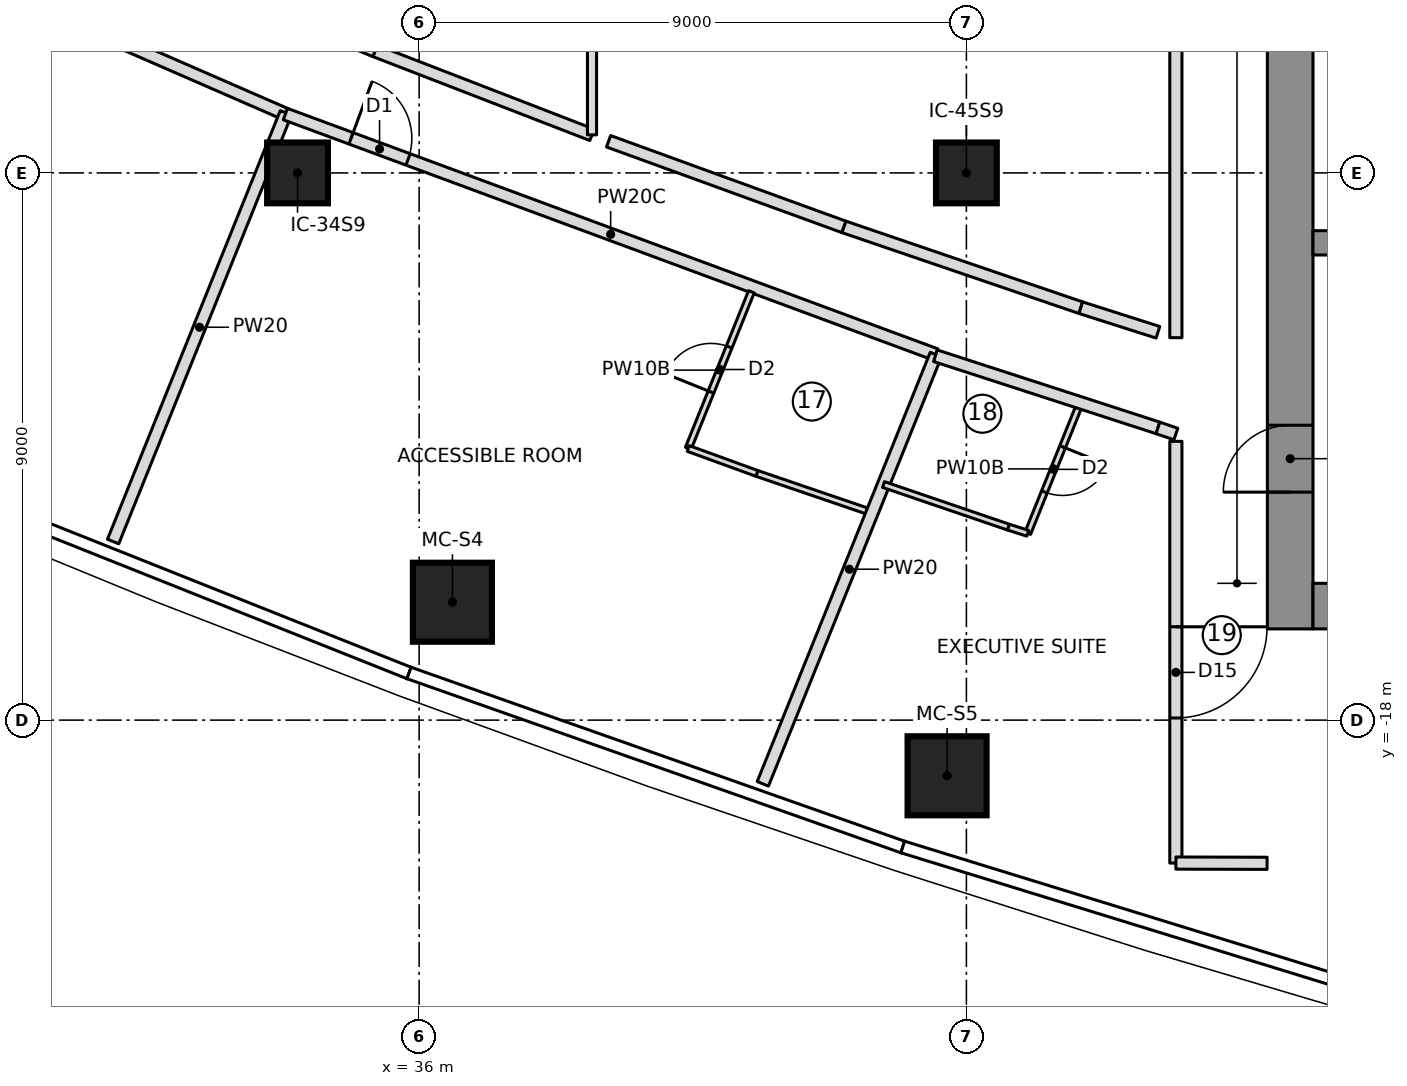
"""IFC4 building model, lengths in metres.
Left out: names, types, materials, properties, quantities, classifications, styles, units other than length and angle.
Written with IfcOpenShell. Run it as: python <this file> out.ifc"""

import sys

from ifc_helpers import new_model, si_unit, direction, frame, frame_2d, origin, origin_2d, place, context, subcontext, project, spatial, rectangle, extrude, element, fill, save


model = new_model("IFC4")
c1 = context("Model", 3, precision=1e-05, world=origin(), true_north=direction((0.0, 1.0)))
c2 = subcontext(c1, "Body", "Model", "MODEL_VIEW")
j1 = project(units=[si_unit("LENGTHUNIT", "METRE"), si_unit("PLANEANGLEUNIT", "RADIAN")], contexts=[c1])
p1 = place(None, origin())
s1 = spatial("IfcSite", under=j1, at=p1, CompositionType="ELEMENT")
p2 = place(p1, origin())
s2 = spatial("IfcBuilding", under=s1, at=p2, CompositionType="ELEMENT")
p3 = place(p2, frame((0.0, 0.0, 186.15)))
s3 = spatial("IfcBuildingStorey", under=s2, at=p3, CompositionType="ELEMENT", Elevation=186.15)
p4 = place(p3, frame((50.325, -16.5, 0.0), z_axis=(0.0, 0.0, 1.0), x_axis=(0.0, 1.0, 0.0)))
e1 = element("IfcWall", 1, at=p4, inside=s3, PredefinedType="SHEAR", context=c2, shape_type="SweptSolid", body=[
    extrude(rectangle(XDim=9.85, YDim=0.75, at=frame_2d((4.925, 0.0))), origin(), (0.0, 0.0, 1.0), 3.55),
])
p5 = place(p4, frame((2.25, 0.0, 0.0)))
e2 = element("IfcOpeningElement", 2, at=p5, cuts=e1, PredefinedType="OPENING", context=c2, shape_type="SweptSolid", body=[
    extrude(rectangle(XDim=1.1, YDim=2.1, at=frame_2d((0.55, 1.05))), frame((0.0, 0.385, 0.0), z_axis=(0.0, -1.0, 0.0), x_axis=(1.0, 0.0, 0.0)), (0.0, 0.0, 1.0), 0.77),
])
p6 = place(p3, frame((50.7, -16.125, 0.0), z_axis=(0.0, 0.0, 1.0), x_axis=(1.0, 0.0, 0.0)))
e3 = element("IfcWall", 3, at=p6, inside=s3, PredefinedType="SHEAR", context=c2, shape_type="SweptSolid", body=[
    extrude(rectangle(XDim=13.77, YDim=0.75, at=frame_2d((6.885, 0.0))), origin(), (0.0, 0.0, 1.0), 3.55),
])
p7 = place(p3, frame((50.7, -10.15, 0.0), z_axis=(0.0, 0.0, 1.0), x_axis=(1.0, 0.0, 0.0)))
e4 = element("IfcWall", 4, at=p7, inside=s3, PredefinedType="SHEAR", context=c2, shape_type="SweptSolid", body=[
    extrude(rectangle(XDim=13.02, YDim=0.4, at=frame_2d((6.51, 0.0))), origin(), (0.0, 0.0, 1.0), 3.55),
])
for number, where, z_axis, x_axis in (
    (5, (36.547, -16.061, 0.0), (0.0, 0.0, 1.0), (1.0, 0.0, 0.0)),
    (6, (44.683, -18.916, 0.0), (0.0, 0.0, 1.0), (1.0, 0.0, 0.0)),
):
    element("IfcColumn", number, at=place(p3, frame(where, z_axis=z_axis, x_axis=x_axis)), inside=s3, PredefinedType="COLUMN", context=c2, shape_type="SweptSolid", body=[
        extrude(rectangle(XDim=1.3, YDim=1.3, at=origin_2d()), origin(), (0.0, 0.0, 1.0), 3.55),
    ])
for number, where, z_axis, x_axis in (
    (7, (34.0, -9.0, 0.0), (0.0, 0.0, 1.0), (1.0, 0.0, 0.0)),
    (8, (45.0, -9.0, 0.0), (0.0, 0.0, 1.0), (1.0, 0.0, 0.0)),
):
    element("IfcColumn", number, at=place(p3, frame(where, z_axis=z_axis, x_axis=x_axis)), inside=s3, PredefinedType="COLUMN", context=c2, shape_type="SweptSolid", body=[
        extrude(rectangle(XDim=1.0, YDim=1.0, at=origin_2d()), origin(), (0.0, 0.0, 1.0), 3.55),
    ])
p8 = place(p3, frame((23.354, -3.479, 0.0), z_axis=(0.0, 0.0, 1.0), x_axis=(0.916726746983, -0.399514794926, 0.0)))
e9 = element("IfcWall", 9, at=p8, inside=s3, PredefinedType="PARTITIONING", context=c2, shape_type="SweptSolid", body=[
    extrude(rectangle(XDim=11.396, YDim=0.2, at=frame_2d((5.698, 0.0))), origin(), (0.0, 0.0, 1.0), 3.25),
])
p9 = place(p8, frame((3.05, 0.0, 0.0)))
e10 = element("IfcOpeningElement", 10, at=p9, cuts=e9, PredefinedType="OPENING", context=c2, shape_type="SweptSolid", body=[
    extrude(rectangle(XDim=1.0, YDim=2.1, at=frame_2d((0.5, 1.05))), frame((0.0, 0.11, 0.0), z_axis=(0.0, -1.0, 0.0), x_axis=(1.0, 0.0, 0.0)), (0.0, 0.0, 1.0), 0.22),
])
p10 = place(p3, frame((30.967, -15.063, 0.0), z_axis=(0.0, 0.0, 1.0), x_axis=(0.373887223455, 0.927474174378, 0.0)))
e11 = element("IfcWall", 11, at=p10, inside=s3, PredefinedType="PARTITIONING", context=c2, shape_type="SweptSolid", body=[
    extrude(rectangle(XDim=7.6, YDim=0.2, at=frame_2d((3.8, 0.0))), origin(), (0.0, 0.0, 1.0), 3.25),
])
p11 = place(p3, frame((33.801, -8.032, 0.0), z_axis=(0.0, 0.0, 1.0), x_axis=(0.937916242759, -0.346861819127, 0.0)))
e12 = element("IfcWall", 12, at=p11, inside=s3, PredefinedType="PARTITIONING", context=c2, shape_type="SweptSolid", body=[
    extrude(rectangle(XDim=11.405, YDim=0.2, at=frame_2d((5.702, 0.0))), origin(), (0.0, 0.0, 1.0), 3.25),
])
p12 = place(p11, frame((1.15, 0.0, 0.0)))
e13 = element("IfcOpeningElement", 13, at=p12, cuts=e12, PredefinedType="OPENING", context=c2, shape_type="SweptSolid", body=[
    extrude(rectangle(XDim=1.0, YDim=2.1, at=frame_2d((0.5, 1.05))), frame((0.0, 0.11, 0.0), z_axis=(0.0, -1.0, 0.0), x_axis=(1.0, 0.0, 0.0)), (0.0, 0.0, 1.0), 0.22),
])
p13 = place(p3, frame((40.426, -13.532, 0.0), z_axis=(0.0, 0.0, 1.0), x_axis=(0.373889095325, 0.927473419779, 0.0)))
e14 = element("IfcWall", 14, at=p13, inside=s3, PredefinedType="PARTITIONING", context=c2, shape_type="SweptSolid", body=[
    extrude(rectangle(XDim=2.778, YDim=0.1, at=frame_2d((1.389, 0.0))), origin(), (0.0, 0.0, 1.0), 3.25),
])
p14 = place(p13, frame((1.0, 0.0, 0.0)))
e15 = element("IfcOpeningElement", 15, at=p14, cuts=e14, PredefinedType="OPENING", context=c2, shape_type="SweptSolid", body=[
    extrude(rectangle(XDim=0.8, YDim=2.1, at=frame_2d((0.4, 1.05))), frame((0.0, 0.06, 0.0), z_axis=(0.0, -1.0, 0.0), x_axis=(1.0, 0.0, 0.0)), (0.0, 0.0, 1.0), 0.12),
])
p15 = place(p3, frame((43.449, -14.589, 0.0), z_axis=(0.0, 0.0, 1.0), x_axis=(-0.94641533286, 0.322952036265, 0.0)))
e16 = element("IfcWall", 16, at=p15, inside=s3, PredefinedType="PARTITIONING", context=c2, shape_type="SweptSolid", body=[
    extrude(rectangle(XDim=2.002, YDim=0.1, at=frame_2d((1.001, 0.0))), origin(), (0.0, 0.0, 1.0), 3.25),
])
p16 = place(p3, frame((41.555, -13.943, 0.0), z_axis=(0.0, 0.0, 1.0), x_axis=(-0.939781557461, 0.341775692897, 0.0)))
e17 = element("IfcWall", 17, at=p16, inside=s3, PredefinedType="PARTITIONING", context=c2, shape_type="SweptSolid", body=[
    extrude(rectangle(XDim=1.201, YDim=0.1, at=frame_2d((0.601, 0.0))), origin(), (0.0, 0.0, 1.0), 3.25),
])
p17 = place(p3, frame((41.652, -19.048, 0.0), z_axis=(0.0, 0.0, 1.0), x_axis=(0.373877998371, 0.927477893178, 0.0)))
e18 = element("IfcWall", 18, at=p17, inside=s3, PredefinedType="PARTITIONING", context=c2, shape_type="SweptSolid", body=[
    extrude(rectangle(XDim=7.611, YDim=0.2, at=frame_2d((3.806, 0.0))), origin(), (0.0, 0.0, 1.0), 3.25),
])
p18 = place(p3, frame((46.863, -12.809, 0.0), z_axis=(0.0, 0.0, 1.0), x_axis=(-0.373877855241, -0.927477950876, 0.0)))
e19 = element("IfcWall", 19, at=p18, inside=s3, PredefinedType="PARTITIONING", context=c2, shape_type="SweptSolid", body=[
    extrude(rectangle(XDim=2.283, YDim=0.1, at=frame_2d((1.142, 0.0))), origin(), (0.0, 0.0, 1.0), 3.25),
])
p19 = place(p18, frame((0.75, 0.0, 0.0)))
e20 = element("IfcOpeningElement", 20, at=p19, cuts=e19, PredefinedType="OPENING", context=c2, shape_type="SweptSolid", body=[
    extrude(rectangle(XDim=0.8, YDim=2.1, at=frame_2d((0.4, 1.05))), frame((0.0, 0.06, 0.0), z_axis=(0.0, -1.0, 0.0), x_axis=(1.0, 0.0, 0.0)), (0.0, 0.0, 1.0), 0.12),
])
p20 = place(p3, frame((46.009, -14.927, 0.0), z_axis=(0.0, 0.0, 1.0), x_axis=(-0.952618746207, 0.304166935045, 0.0)))
e21 = element("IfcWall", 21, at=p20, inside=s3, PredefinedType="PARTITIONING", context=c2, shape_type="SweptSolid", body=[
    extrude(rectangle(XDim=0.335, YDim=0.1, at=frame_2d((0.167, 0.0))), origin(), (0.0, 0.0, 1.0), 3.25),
])
p21 = place(p3, frame((45.69, -14.825, 0.0), z_axis=(0.0, 0.0, 1.0), x_axis=(-0.946442988685, 0.322870979136, 0.0)))
e22 = element("IfcWall", 22, at=p21, inside=s3, PredefinedType="PARTITIONING", context=c2, shape_type="SweptSolid", body=[
    extrude(rectangle(XDim=2.169, YDim=0.1, at=frame_2d((1.085, 0.0))), origin(), (0.0, 0.0, 1.0), 3.25),
])
p22 = place(p3, frame((38.843, -8.374, 0.0), z_axis=(0.0, 0.0, 1.0), x_axis=(-0.932681040007, 0.360702200731, 0.0)))
e23 = element("IfcWall", 23, at=p22, inside=s3, PredefinedType="PARTITIONING", context=c2, shape_type="SweptSolid", body=[
    extrude(rectangle(XDim=3.825, YDim=0.2, at=frame_2d((1.913, 0.0))), origin(), (0.0, 0.0, 1.0), 3.25),
])
p23 = place(p3, frame((35.276, -6.994, 0.0), z_axis=(0.0, 0.0, 1.0), x_axis=(-0.925186207522, 0.37951347988, 0.0)))
e24 = element("IfcWall", 24, at=p23, inside=s3, PredefinedType="PARTITIONING", context=c2, shape_type="SweptSolid", body=[
    extrude(rectangle(XDim=2.375, YDim=0.2, at=frame_2d((1.187, 0.0))), origin(), (0.0, 0.0, 1.0), 3.25),
])
p24 = place(p3, frame((38.843, -8.374, 0.0), z_axis=(0.0, 0.0, 1.0), x_axis=(0.0, 1.0, 0.0)))
e25 = element("IfcWall", 25, at=p24, inside=s3, PredefinedType="PARTITIONING", context=c2, shape_type="SweptSolid", body=[
    extrude(rectangle(XDim=16.748, YDim=0.15, at=frame_2d((8.374, 0.0))), origin(), (0.0, 0.0, 1.0), 3.25),
])
for number, where, z_axis, x_axis in (
    (26, (46.881, -11.217, 0.0), (0.0, 0.0, 1.0), (-0.946, 0.323, 0.0)),
    (27, (42.984, -9.887, 0.0), (0.0, 0.0, 1.0), (-0.94, 0.342, 0.0)),
):
    element("IfcWall", number, at=place(p3, frame(where, z_axis=z_axis, x_axis=x_axis)), inside=s3, PredefinedType="PARTITIONING", context=c2, shape_type="SweptSolid", body=[
        extrude(rectangle(XDim=4.117, YDim=0.2, at=frame_2d((2.059, 0.0))), origin(), (0.0, 0.0, 1.0), 3.25),
    ])
p25 = place(p3, frame((44.49, -12.007, 0.0), z_axis=(0.0, 0.0, 1.0), x_axis=(0.951228355446, -0.308487626648, 0.0)))
e28 = element("IfcWall", 28, at=p25, inside=s3, PredefinedType="PARTITIONING", context=c2, shape_type="SweptSolid", body=[
    extrude(rectangle(XDim=3.847, YDim=0.2, at=frame_2d((1.924, 0.0))), origin(), (0.0, 0.0, 1.0), 3.25),
])
p26 = place(p3, frame((48.15, -11.621, 0.0), z_axis=(0.0, 0.0, 1.0), x_axis=(-0.952761948983, 0.303718074157, 0.0)))
e29 = element("IfcWall", 29, at=p26, inside=s3, PredefinedType="PARTITIONING", context=c2, shape_type="SweptSolid", body=[
    extrude(rectangle(XDim=1.332, YDim=0.2, at=frame_2d((0.666, 0.0))), origin(), (0.0, 0.0, 1.0), 3.25),
])
p27 = place(p3, frame((48.445, 11.71, 0.0), z_axis=(0.0, 0.0, 1.0), x_axis=(0.0, -1.0, 0.0)))
e30 = element("IfcWall", 30, at=p27, inside=s3, PredefinedType="PARTITIONING", context=c2, shape_type="SweptSolid", body=[
    extrude(rectangle(XDim=23.42, YDim=0.2, at=frame_2d((11.71, 0.0))), origin(), (0.0, 0.0, 1.0), 3.25),
])
p28 = place(p3, frame((48.15, -13.194, 0.0), z_axis=(0.0, 0.0, 1.0), x_axis=(0.946069343286, -0.323964191994, 0.0)))
e31 = element("IfcWall", 31, at=p28, inside=s3, PredefinedType="PARTITIONING", context=c2, shape_type="SweptSolid", body=[
    extrude(rectangle(XDim=0.312, YDim=0.2, at=frame_2d((0.156, 0.0))), origin(), (0.0, 0.0, 1.0), 3.25),
])
p29 = place(p3, frame((48.445, -13.415, 0.0), z_axis=(0.0, 0.0, 1.0), x_axis=(0.0, -1.0, 0.0)))
e32 = element("IfcWall", 32, at=p29, inside=s3, PredefinedType="PARTITIONING", context=c2, shape_type="SweptSolid", body=[
    extrude(rectangle(XDim=6.936, YDim=0.2, at=frame_2d((3.468, 0.0))), origin(), (0.0, 0.0, 1.0), 3.25),
])
p30 = place(p29, frame((3.05, 0.0, 0.0)))
e33 = element("IfcOpeningElement", 33, at=p30, cuts=e32, PredefinedType="OPENING", context=c2, shape_type="SweptSolid", body=[
    extrude(rectangle(XDim=1.5, YDim=2.1, at=frame_2d((0.75, 1.05))), frame((0.0, 0.11, 0.0), z_axis=(0.0, -1.0, 0.0), x_axis=(1.0, 0.0, 0.0)), (0.0, 0.0, 1.0), 0.22),
])
p31 = place(p3, frame((48.445, -20.351, 0.0), z_axis=(0.0, 0.0, 1.0), x_axis=(0.999996609175, -0.002604157836, 0.0)))
e34 = element("IfcWall", 34, at=p31, inside=s3, PredefinedType="PARTITIONING", context=c2, shape_type="SweptSolid", body=[
    extrude(rectangle(XDim=1.5, YDim=0.2, at=frame_2d((0.75, 0.0))), origin(), (0.0, 0.0, 1.0), 3.25),
])
p32 = place(p14, origin())
e35 = element("IfcDoor", 35, at=p32, inside=s3, OperationType="SINGLE_SWING_LEFT", PredefinedType="DOOR", context=c2, shape_type="SweptSolid", body=[
    extrude(rectangle(XDim=0.8, YDim=2.1, at=frame_2d((0.4, 1.05))), frame((0.0, 0.025, 0.0), z_axis=(0.0, -1.0, 0.0), x_axis=(1.0, 0.0, 0.0)), (0.0, 0.0, 1.0), 0.05),
])
fill(e15, e35)
p33 = place(p12, origin())
e36 = element("IfcDoor", 36, at=p33, inside=s3, OperationType="SINGLE_SWING_LEFT", PredefinedType="DOOR", context=c2, shape_type="SweptSolid", body=[
    extrude(rectangle(XDim=1.0, YDim=2.1, at=frame_2d((0.5, 1.05))), frame((0.0, 0.025, 0.0), z_axis=(0.0, -1.0, 0.0), x_axis=(1.0, 0.0, 0.0)), (0.0, 0.0, 1.0), 0.05),
])
fill(e13, e36)
p34 = place(p19, origin())
e37 = element("IfcDoor", 37, at=p34, inside=s3, OperationType="SINGLE_SWING_LEFT", PredefinedType="DOOR", context=c2, shape_type="SweptSolid", body=[
    extrude(rectangle(XDim=0.8, YDim=2.1, at=frame_2d((0.4, 1.05))), frame((0.0, 0.025, 0.0), z_axis=(0.0, -1.0, 0.0), x_axis=(1.0, 0.0, 0.0)), (0.0, 0.0, 1.0), 0.05),
])
fill(e20, e37)
p35 = place(p30, origin())
e38 = element("IfcDoor", 38, at=p35, inside=s3, OperationType="DOUBLE_DOOR_SINGLE_SWING", PredefinedType="DOOR", context=c2, shape_type="SweptSolid", body=[
    extrude(rectangle(XDim=1.5, YDim=2.1, at=frame_2d((0.75, 1.05))), frame((0.0, 0.025, 0.0), z_axis=(0.0, -1.0, 0.0), x_axis=(1.0, 0.0, 0.0)), (0.0, 0.0, 1.0), 0.05),
])
fill(e33, e38)
p36 = place(p5, origin())
e39 = element("IfcDoor", 39, at=p36, inside=s3, OperationType="SINGLE_SWING_RIGHT", PredefinedType="DOOR", context=c2, shape_type="SweptSolid", body=[
    extrude(rectangle(XDim=1.1, YDim=2.1, at=frame_2d((0.55, 1.05))), frame((0.0, 0.025, 0.0), z_axis=(0.0, -1.0, 0.0), x_axis=(1.0, 0.0, 0.0)), (0.0, 0.0, 1.0), 0.05),
])
fill(e2, e39)
save(model, sys.argv[1])
